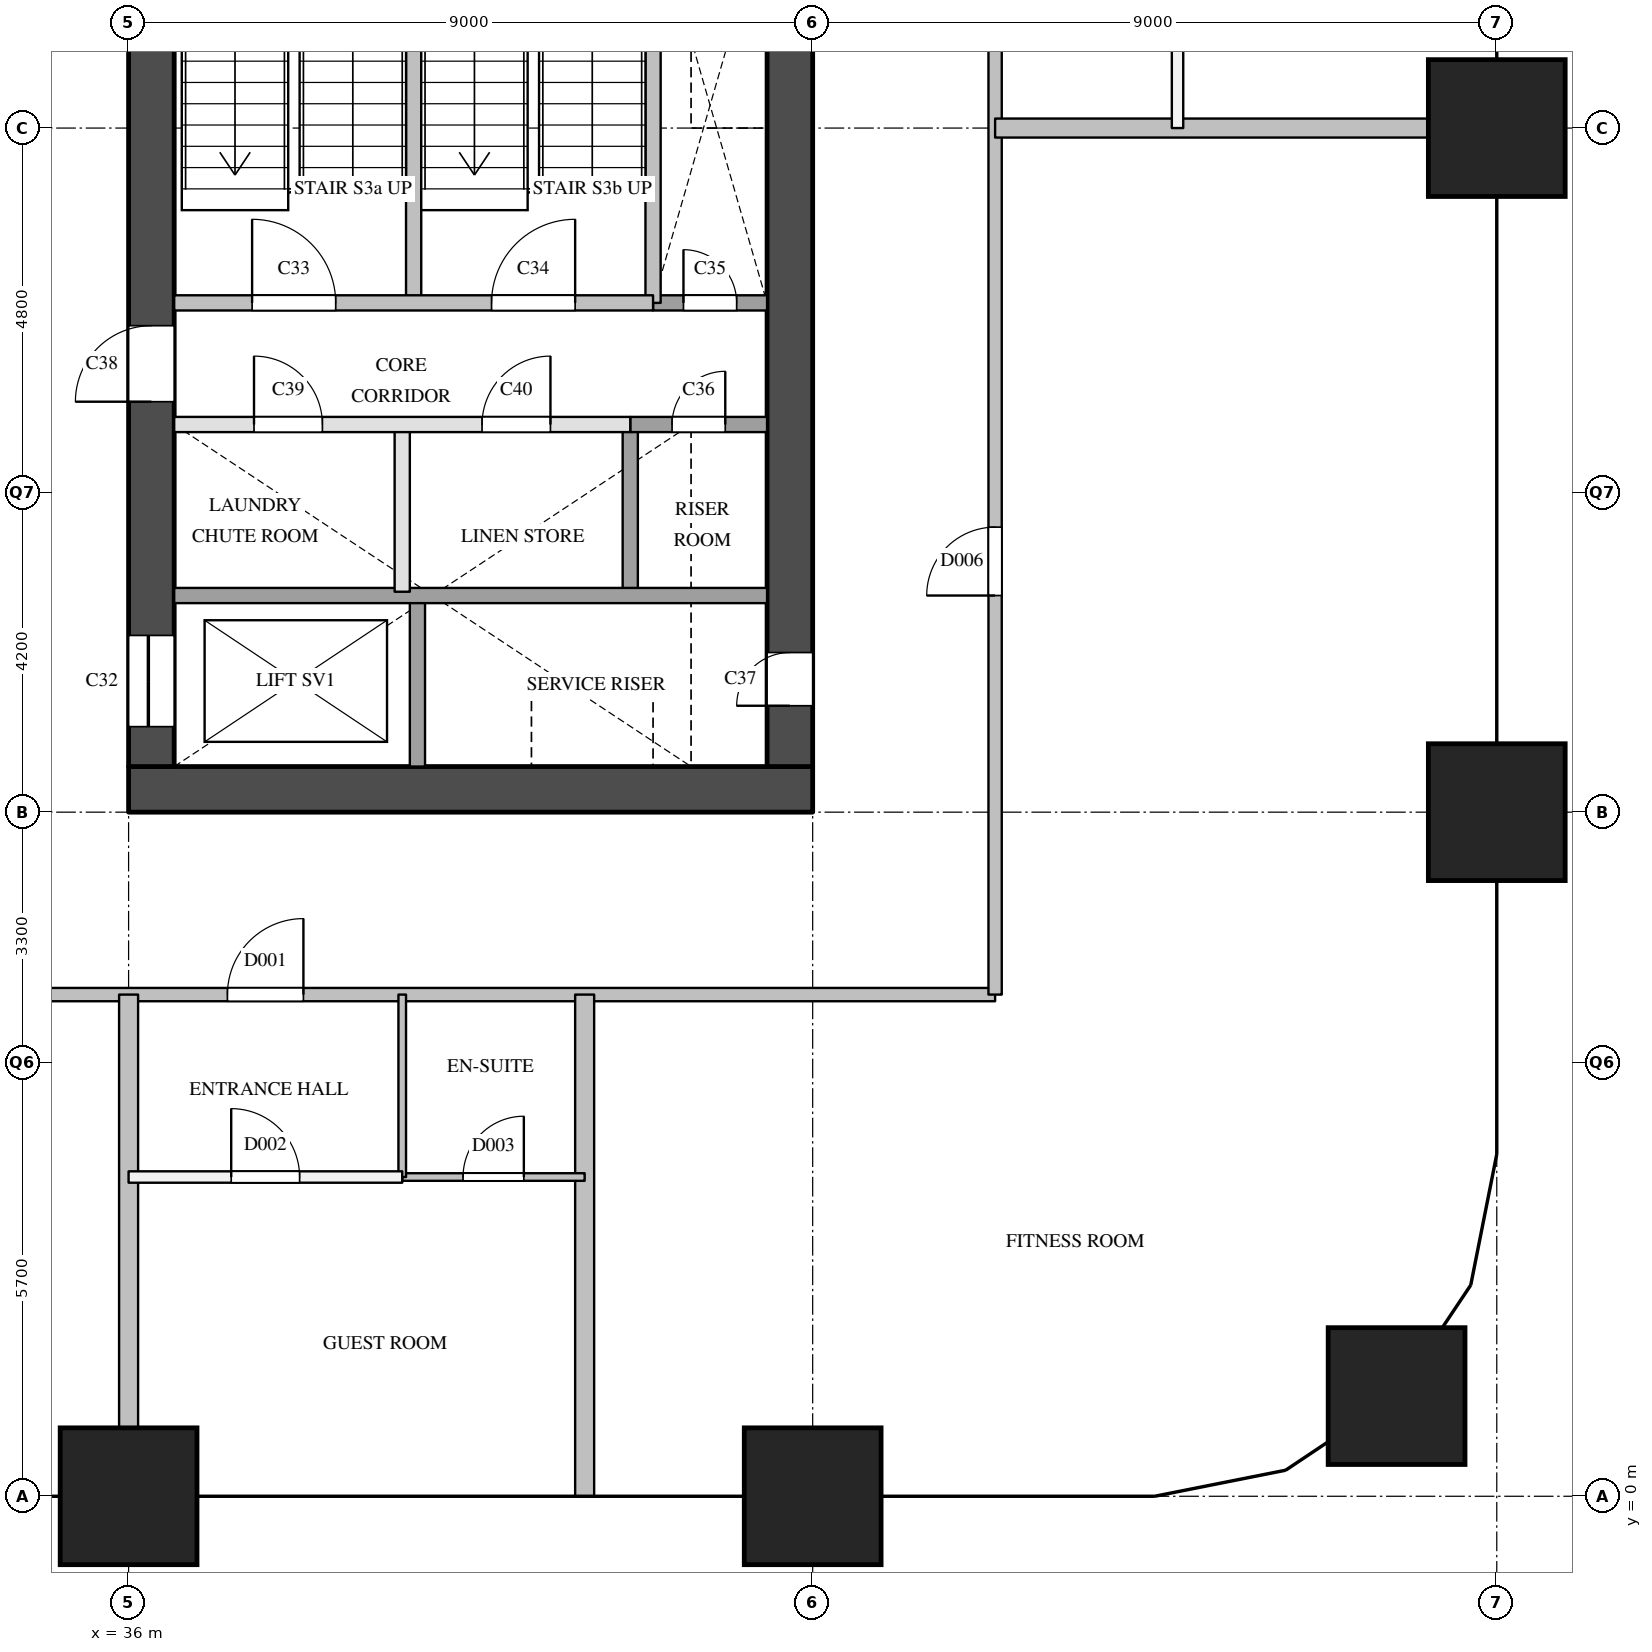
"""IFC4 building model, lengths in metres.
Left out: names, types, materials, properties, quantities, classifications, styles, units other than length and angle.
Written with IfcOpenShell. Run it as: python <this file> out.ifc"""

import sys

from ifc_helpers import new_model, si_unit, direction, frame, frame_2d, origin, origin_2d, place, context, subcontext, project, spatial, rectangle, extrude, element, fill, save


model = new_model("IFC4")
c1 = context("Model", 3, precision=1e-05, world=origin(), true_north=direction((0.0, 1.0)))
c2 = subcontext(c1, "Body", "Model", "MODEL_VIEW")
j1 = project(units=[si_unit("LENGTHUNIT", "METRE"), si_unit("PLANEANGLEUNIT", "RADIAN")], contexts=[c1])
p1 = place(None, origin())
s1 = spatial("IfcSite", under=j1, at=p1, CompositionType="ELEMENT")
p2 = place(p1, origin())
s2 = spatial("IfcBuilding", under=s1, at=p2, CompositionType="ELEMENT")
p3 = place(p2, frame((0.0, 0.0, 65.2)))
s3 = spatial("IfcBuildingStorey", under=s2, at=p3, CompositionType="ELEMENT", Elevation=65.2)
for number, where, z_axis, x_axis in (
    (1, (36.0, 0.0, 0.0), (0.0, 0.0, 1.0), (1.0, 0.0, 0.0)),
    (2, (45.0, 0.0, 0.0), (0.0, 0.0, 1.0), (1.0, 0.0, 0.0)),
    (3, (52.682, 1.318, 0.0), (0.0, 0.0, 1.0), (1.0, 0.0, 0.0)),
    (4, (54.0, 9.0, 0.0), (0.0, 0.0, 1.0), (1.0, 0.0, 0.0)),
    (5, (54.0, 18.0, 0.0), (0.0, 0.0, 1.0), (1.0, 0.0, 0.0)),
):
    element("IfcColumn", number, at=place(p3, frame(where, z_axis=z_axis, x_axis=x_axis)), inside=s3, PredefinedType="COLUMN", context=c2, shape_type="SweptSolid", body=[
        extrude(rectangle(XDim=1.8, YDim=1.8, at=origin_2d()), origin(), (0.0, 0.0, 1.0), 3.8),
    ])
p4 = place(p3, frame((36.0, 9.3, 0.0), z_axis=(0.0, 0.0, 1.0), x_axis=(1.0, 0.0, 0.0)))
e6 = element("IfcWall", 6, at=p4, inside=s3, PredefinedType="SHEAR", context=c2, shape_type="SweptSolid", body=[
    extrude(rectangle(XDim=9.0, YDim=0.6, at=frame_2d((4.5, 0.0))), origin(), (0.0, 0.0, 1.0), 3.5),
])
p5 = place(p3, frame((36.3, 9.6, 0.0), z_axis=(0.0, 0.0, 1.0), x_axis=(0.0, 1.0, 0.0)))
e7 = element("IfcWall", 7, at=p5, inside=s3, PredefinedType="SHEAR", context=c2, shape_type="SweptSolid", body=[
    extrude(rectangle(XDim=12.3, YDim=0.6, at=frame_2d((6.15, 0.0))), origin(), (0.0, 0.0, 1.0), 3.5),
])
p6 = place(p5, frame((0.525, 0.0, 0.0)))
e8 = element("IfcOpeningElement", 8, at=p6, cuts=e7, PredefinedType="OPENING", context=c2, shape_type="SweptSolid", body=[
    extrude(rectangle(XDim=1.2, YDim=2.1, at=frame_2d((0.6, 1.05))), frame((0.0, 0.31, 0.0), z_axis=(0.0, -1.0, 0.0), x_axis=(1.0, 0.0, 0.0)), (0.0, 0.0, 1.0), 0.62),
])
p7 = place(p5, frame((4.8, 0.0, 0.0)))
e9 = element("IfcOpeningElement", 9, at=p7, cuts=e7, PredefinedType="OPENING", context=c2, shape_type="SweptSolid", body=[
    extrude(rectangle(XDim=1.0, YDim=2.1, at=frame_2d((0.5, 1.05))), frame((0.0, 0.31, 0.0), z_axis=(0.0, -1.0, 0.0), x_axis=(1.0, 0.0, 0.0)), (0.0, 0.0, 1.0), 0.62),
])
p8 = place(p3, frame((44.7, 9.6, 0.0), z_axis=(0.0, 0.0, 1.0), x_axis=(0.0, 1.0, 0.0)))
e10 = element("IfcWall", 10, at=p8, inside=s3, PredefinedType="SHEAR", context=c2, shape_type="SweptSolid", body=[
    extrude(rectangle(XDim=12.3, YDim=0.6, at=frame_2d((6.15, 0.0))), origin(), (0.0, 0.0, 1.0), 3.5),
])
p9 = place(p8, frame((0.8, 0.0, 0.0)))
e11 = element("IfcOpeningElement", 11, at=p9, cuts=e10, PredefinedType="OPENING", context=c2, shape_type="SweptSolid", body=[
    extrude(rectangle(XDim=0.7, YDim=2.1, at=frame_2d((0.35, 1.05))), frame((0.0, 0.31, 0.0), z_axis=(0.0, -1.0, 0.0), x_axis=(1.0, 0.0, 0.0)), (0.0, 0.0, 1.0), 0.62),
])
p10 = place(p3, frame((39.6, 11.9, 0.0), z_axis=(0.0, 0.0, 1.0), x_axis=(0.0, 1.0, 0.0)))
e12 = element("IfcWall", 12, at=p10, inside=s3, PredefinedType="PARTITIONING", context=c2, shape_type="SweptSolid", body=[
    extrude(rectangle(XDim=2.2, YDim=0.2, at=frame_2d((1.1, 0.0))), origin(), (0.0, 0.0, 1.0), 3.5),
])
p11 = place(p3, frame((39.75, 15.7, 0.0), z_axis=(0.0, 0.0, 1.0), x_axis=(0.0, 1.0, 0.0)))
e13 = element("IfcWall", 13, at=p11, inside=s3, PredefinedType="SOLIDWALL", context=c2, shape_type="SweptSolid", body=[
    extrude(rectangle(XDim=4.3, YDim=0.2, at=frame_2d((2.15, 0.0))), origin(), (0.0, 0.0, 1.0), 3.5),
])
p12 = place(p3, frame((39.8, 9.6, 0.0), z_axis=(0.0, 0.0, 1.0), x_axis=(0.0, 1.0, 0.0)))
e14 = element("IfcWall", 14, at=p12, inside=s3, PredefinedType="SOLIDWALL", context=c2, shape_type="SweptSolid", body=[
    extrude(rectangle(XDim=2.3, YDim=0.2, at=frame_2d((1.15, 0.0))), origin(), (0.0, 0.0, 1.0), 3.5),
])
p13 = place(p3, frame((42.6, 11.9, 0.0), z_axis=(0.0, 0.0, 1.0), x_axis=(0.0, 1.0, 0.0)))
e15 = element("IfcWall", 15, at=p13, inside=s3, PredefinedType="SOLIDWALL", context=c2, shape_type="SweptSolid", body=[
    extrude(rectangle(XDim=2.2, YDim=0.2, at=frame_2d((1.1, 0.0))), origin(), (0.0, 0.0, 1.0), 3.5),
])
p14 = place(p3, frame((42.9, 15.7, 0.0), z_axis=(0.0, 0.0, 1.0), x_axis=(0.0, 1.0, 0.0)))
e16 = element("IfcWall", 16, at=p14, inside=s3, PredefinedType="SOLIDWALL", context=c2, shape_type="SweptSolid", body=[
    extrude(rectangle(XDim=4.3, YDim=0.2, at=frame_2d((2.15, 0.0))), origin(), (0.0, 0.0, 1.0), 3.5),
])
p15 = place(p3, frame((36.6, 11.85, 0.0), z_axis=(0.0, 0.0, 1.0), x_axis=(1.0, 0.0, 0.0)))
e17 = element("IfcWall", 17, at=p15, inside=s3, PredefinedType="SOLIDWALL", context=c2, shape_type="SweptSolid", body=[
    extrude(rectangle(XDim=7.8, YDim=0.2, at=frame_2d((3.9, 0.0))), origin(), (0.0, 0.0, 1.0), 3.5),
])
p16 = place(p3, frame((36.6, 14.1, 0.0), z_axis=(0.0, 0.0, 1.0), x_axis=(1.0, 0.0, 0.0)))
e18 = element("IfcWall", 18, at=p16, inside=s3, PredefinedType="PARTITIONING", context=c2, shape_type="SweptSolid", body=[
    extrude(rectangle(XDim=6.0, YDim=0.2, at=frame_2d((3.0, 0.0))), origin(), (0.0, 0.0, 1.0), 3.5),
])
p17 = place(p16, frame((1.05, 0.0, 0.0)))
e19 = element("IfcOpeningElement", 19, at=p17, cuts=e18, PredefinedType="OPENING", context=c2, shape_type="SweptSolid", body=[
    extrude(rectangle(XDim=0.9, YDim=2.1, at=frame_2d((0.45, 1.05))), frame((0.0, 0.11, 0.0), z_axis=(0.0, -1.0, 0.0), x_axis=(1.0, 0.0, 0.0)), (0.0, 0.0, 1.0), 0.22),
])
p18 = place(p16, frame((4.05, 0.0, 0.0)))
e20 = element("IfcOpeningElement", 20, at=p18, cuts=e18, PredefinedType="OPENING", context=c2, shape_type="SweptSolid", body=[
    extrude(rectangle(XDim=0.9, YDim=2.1, at=frame_2d((0.45, 1.05))), frame((0.0, 0.11, 0.0), z_axis=(0.0, -1.0, 0.0), x_axis=(1.0, 0.0, 0.0)), (0.0, 0.0, 1.0), 0.22),
])
p19 = place(p3, frame((42.6, 14.1, 0.0), z_axis=(0.0, 0.0, 1.0), x_axis=(1.0, 0.0, 0.0)))
e21 = element("IfcWall", 21, at=p19, inside=s3, PredefinedType="SOLIDWALL", context=c2, shape_type="SweptSolid", body=[
    extrude(rectangle(XDim=1.8, YDim=0.2, at=frame_2d((0.9, 0.0))), origin(), (0.0, 0.0, 1.0), 3.5),
])
p20 = place(p19, frame((0.55, 0.0, 0.0)))
e22 = element("IfcOpeningElement", 22, at=p20, cuts=e21, PredefinedType="OPENING", context=c2, shape_type="SweptSolid", body=[
    extrude(rectangle(XDim=0.7, YDim=2.1, at=frame_2d((0.35, 1.05))), frame((0.0, 0.11, 0.0), z_axis=(0.0, -1.0, 0.0), x_axis=(1.0, 0.0, 0.0)), (0.0, 0.0, 1.0), 0.22),
])
p21 = place(p3, frame((42.9, 15.7, 0.0), z_axis=(0.0, 0.0, 1.0), x_axis=(1.0, 0.0, 0.0)))
e23 = element("IfcWall", 23, at=p21, inside=s3, PredefinedType="SOLIDWALL", context=c2, shape_type="SweptSolid", body=[
    extrude(rectangle(XDim=1.5, YDim=0.2, at=frame_2d((0.75, 0.0))), origin(), (0.0, 0.0, 1.0), 3.5),
])
p22 = place(p21, frame((0.4, 0.0, 0.0)))
e24 = element("IfcOpeningElement", 24, at=p22, cuts=e23, PredefinedType="OPENING", context=c2, shape_type="SweptSolid", body=[
    extrude(rectangle(XDim=0.7, YDim=2.1, at=frame_2d((0.35, 1.05))), frame((0.0, 0.11, 0.0), z_axis=(0.0, -1.0, 0.0), x_axis=(1.0, 0.0, 0.0)), (0.0, 0.0, 1.0), 0.22),
])
p23 = place(p3, frame((36.6, 15.7, 0.0), z_axis=(0.0, 0.0, 1.0), x_axis=(1.0, 0.0, 0.0)))
e25 = element("IfcWall", 25, at=p23, inside=s3, PredefinedType="SOLIDWALL", context=c2, shape_type="SweptSolid", body=[
    extrude(rectangle(XDim=6.3, YDim=0.2, at=frame_2d((3.15, 0.0))), origin(), (0.0, 0.0, 1.0), 3.5),
])
p24 = place(p23, frame((1.025, 0.0, 0.0)))
e26 = element("IfcOpeningElement", 26, at=p24, cuts=e25, PredefinedType="OPENING", context=c2, shape_type="SweptSolid", body=[
    extrude(rectangle(XDim=1.1, YDim=2.1, at=frame_2d((0.55, 1.05))), frame((0.0, 0.11, 0.0), z_axis=(0.0, -1.0, 0.0), x_axis=(1.0, 0.0, 0.0)), (0.0, 0.0, 1.0), 0.22),
])
p25 = place(p23, frame((4.175, 0.0, 0.0)))
e27 = element("IfcOpeningElement", 27, at=p25, cuts=e25, PredefinedType="OPENING", context=c2, shape_type="SweptSolid", body=[
    extrude(rectangle(XDim=1.1, YDim=2.1, at=frame_2d((0.55, 1.05))), frame((0.0, 0.11, 0.0), z_axis=(0.0, -1.0, 0.0), x_axis=(1.0, 0.0, 0.0)), (0.0, 0.0, 1.0), 0.22),
])
p26 = place(p3, frame((33.6, 6.6, 0.0), z_axis=(0.0, 0.0, 1.0), x_axis=(1.0, 0.0, 0.0)))
e28 = element("IfcWall", 28, at=p26, inside=s3, PredefinedType="PARTITIONING", context=c2, shape_type="SweptSolid", body=[
    extrude(rectangle(XDim=13.8, YDim=0.175, at=frame_2d((6.9, 0.0))), origin(), (0.0, 0.0, 1.0), 3.5),
])
p27 = place(p26, frame((3.7, 0.0, 0.0)))
e29 = element("IfcOpeningElement", 29, at=p27, cuts=e28, PredefinedType="OPENING", context=c2, shape_type="SweptSolid", body=[
    extrude(rectangle(XDim=1.0, YDim=2.1, at=frame_2d((0.5, 1.05))), frame((0.0, 0.097, 0.0), z_axis=(0.0, -1.0, 0.0), x_axis=(1.0, 0.0, 0.0)), (0.0, 0.0, 1.0), 0.195),
])
p28 = place(p3, frame((47.4, 6.6, 0.0), z_axis=(0.0, 0.0, 1.0), x_axis=(0.0, 1.0, 0.0)))
e30 = element("IfcWall", 30, at=p28, inside=s3, PredefinedType="PARTITIONING", context=c2, shape_type="SweptSolid", body=[
    extrude(rectangle(XDim=18.3, YDim=0.175, at=frame_2d((9.15, 0.0))), origin(), (0.0, 0.0, 1.0), 3.5),
])
p29 = place(p28, frame((5.25, 0.0, 0.0)))
e31 = element("IfcOpeningElement", 31, at=p29, cuts=e30, PredefinedType="OPENING", context=c2, shape_type="SweptSolid", body=[
    extrude(rectangle(XDim=0.9, YDim=2.1, at=frame_2d((0.45, 1.05))), frame((0.0, 0.097, 0.0), z_axis=(0.0, -1.0, 0.0), x_axis=(1.0, 0.0, 0.0)), (0.0, 0.0, 1.0), 0.195),
])
p30 = place(p28, frame((12.7, 0.0, 0.0)))
e32 = element("IfcOpeningElement", 32, at=p30, cuts=e30, PredefinedType="OPENING", context=c2, shape_type="SweptSolid", body=[
    extrude(rectangle(XDim=1.0, YDim=2.1, at=frame_2d((0.5, 1.05))), frame((0.0, 0.097, 0.0), z_axis=(0.0, -1.0, 0.0), x_axis=(1.0, 0.0, 0.0)), (0.0, 0.0, 1.0), 0.195),
])
p31 = place(p3, frame((36.0, 4.2, 0.0), z_axis=(0.0, 0.0, 1.0), x_axis=(1.0, 0.0, 0.0)))
e33 = element("IfcWall", 33, at=p31, inside=s3, PredefinedType="PARTITIONING", context=c2, shape_type="SweptSolid", body=[
    extrude(rectangle(XDim=3.6, YDim=0.15, at=frame_2d((1.8, 0.0))), origin(), (0.0, 0.0, 1.0), 3.5),
])
p32 = place(p31, frame((1.35, 0.0, 0.0)))
e34 = element("IfcOpeningElement", 34, at=p32, cuts=e33, PredefinedType="OPENING", context=c2, shape_type="SweptSolid", body=[
    extrude(rectangle(XDim=0.9, YDim=2.1, at=frame_2d((0.45, 1.05))), frame((0.0, 0.085, 0.0), z_axis=(0.0, -1.0, 0.0), x_axis=(1.0, 0.0, 0.0)), (0.0, 0.0, 1.0), 0.17),
])
p33 = place(p3, frame((49.8, 18.0, 0.0), z_axis=(0.0, 0.0, 1.0), x_axis=(0.0, 1.0, 0.0)))
e35 = element("IfcWall", 35, at=p33, inside=s3, PredefinedType="PARTITIONING", context=c2, shape_type="SweptSolid", body=[
    extrude(rectangle(XDim=3.6, YDim=0.15, at=frame_2d((1.8, 0.0))), origin(), (0.0, 0.0, 1.0), 3.5),
])
p34 = place(p33, frame((1.35, 0.0, 0.0)))
e36 = element("IfcOpeningElement", 36, at=p34, cuts=e35, PredefinedType="OPENING", context=c2, shape_type="SweptSolid", body=[
    extrude(rectangle(XDim=0.9, YDim=2.1, at=frame_2d((0.45, 1.05))), frame((0.0, 0.085, 0.0), z_axis=(0.0, -1.0, 0.0), x_axis=(1.0, 0.0, 0.0)), (0.0, 0.0, 1.0), 0.17),
])
for number, where, z_axis, x_axis in (
    (37, (47.4, 18.0, 0.0), (0.0, 0.0, 1.0), (1.0, 0.0, 0.0)),
    (38, (36.0, 0.0, 0.0), (0.0, 0.0, 1.0), (0.0, 1.0, 0.0)),
):
    element("IfcWall", number, at=place(p3, frame(where, z_axis=z_axis, x_axis=x_axis)), inside=s3, PredefinedType="PARTITIONING", context=c2, shape_type="SweptSolid", body=[
        extrude(rectangle(XDim=6.6, YDim=0.25, at=frame_2d((3.3, 0.0))), origin(), (0.0, 0.0, 1.0), 3.5),
    ])
p35 = place(p3, frame((42.0, 0.0, 0.0), z_axis=(0.0, 0.0, 1.0), x_axis=(0.0, 1.0, 0.0)))
e39 = element("IfcWall", 39, at=p35, inside=s3, PredefinedType="PARTITIONING", context=c2, shape_type="SweptSolid", body=[
    extrude(rectangle(XDim=6.6, YDim=0.25, at=frame_2d((3.3, 0.0))), origin(), (0.0, 0.0, 1.0), 2.5),
])
p36 = place(p3, frame((39.6, 4.2, 0.0), z_axis=(0.0, 0.0, 1.0), x_axis=(1.0, 0.0, 0.0)))
e40 = element("IfcWall", 40, at=p36, inside=s3, PredefinedType="PARTITIONING", context=c2, shape_type="SweptSolid", body=[
    extrude(rectangle(XDim=2.4, YDim=0.1, at=frame_2d((1.2, 0.0))), origin(), (0.0, 0.0, 1.0), 3.5),
])
p37 = place(p36, frame((0.8, 0.0, 0.0)))
e41 = element("IfcOpeningElement", 41, at=p37, cuts=e40, PredefinedType="OPENING", context=c2, shape_type="SweptSolid", body=[
    extrude(rectangle(XDim=0.8, YDim=2.1, at=frame_2d((0.4, 1.05))), frame((0.0, 0.06, 0.0), z_axis=(0.0, -1.0, 0.0), x_axis=(1.0, 0.0, 0.0)), (0.0, 0.0, 1.0), 0.12),
])
p38 = place(p3, frame((39.6, 4.2, 0.0), z_axis=(0.0, 0.0, 1.0), x_axis=(0.0, 1.0, 0.0)))
e42 = element("IfcWall", 42, at=p38, inside=s3, PredefinedType="PARTITIONING", context=c2, shape_type="SweptSolid", body=[
    extrude(rectangle(XDim=2.4, YDim=0.1, at=frame_2d((1.2, 0.0))), origin(), (0.0, 0.0, 1.0), 3.5),
])
p39 = place(p6, origin())
e43 = element("IfcDoor", 43, at=p39, inside=s3, OperationType="SLIDING_TO_LEFT", PredefinedType="DOOR", context=c2, shape_type="SweptSolid", body=[
    extrude(rectangle(XDim=1.2, YDim=2.1, at=frame_2d((0.6, 1.05))), frame((0.0, 0.025, 0.0), z_axis=(0.0, -1.0, 0.0), x_axis=(1.0, 0.0, 0.0)), (0.0, 0.0, 1.0), 0.05),
])
fill(e8, e43)
p40 = place(p24, origin())
e44 = element("IfcDoor", 44, at=p40, inside=s3, OperationType="SINGLE_SWING_LEFT", PredefinedType="DOOR", context=c2, shape_type="SweptSolid", body=[
    extrude(rectangle(XDim=1.1, YDim=2.1, at=frame_2d((0.55, 1.05))), frame((0.0, 0.025, 0.0), z_axis=(0.0, -1.0, 0.0), x_axis=(1.0, 0.0, 0.0)), (0.0, 0.0, 1.0), 0.05),
])
fill(e26, e44)
p41 = place(p25, origin())
e45 = element("IfcDoor", 45, at=p41, inside=s3, OperationType="SINGLE_SWING_RIGHT", PredefinedType="DOOR", context=c2, shape_type="SweptSolid", body=[
    extrude(rectangle(XDim=1.1, YDim=2.1, at=frame_2d((0.55, 1.05))), frame((0.0, 0.025, 0.0), z_axis=(0.0, -1.0, 0.0), x_axis=(1.0, 0.0, 0.0)), (0.0, 0.0, 1.0), 0.05),
])
fill(e27, e45)
p42 = place(p22, origin())
e46 = element("IfcDoor", 46, at=p42, inside=s3, OperationType="SINGLE_SWING_LEFT", PredefinedType="DOOR", context=c2, shape_type="SweptSolid", body=[
    extrude(rectangle(XDim=0.7, YDim=2.1, at=frame_2d((0.35, 1.05))), frame((0.0, 0.025, 0.0), z_axis=(0.0, -1.0, 0.0), x_axis=(1.0, 0.0, 0.0)), (0.0, 0.0, 1.0), 0.05),
])
fill(e24, e46)
p43 = place(p20, origin())
e47 = element("IfcDoor", 47, at=p43, inside=s3, OperationType="SINGLE_SWING_RIGHT", PredefinedType="DOOR", context=c2, shape_type="SweptSolid", body=[
    extrude(rectangle(XDim=0.7, YDim=2.1, at=frame_2d((0.35, 1.05))), frame((0.0, 0.025, 0.0), z_axis=(0.0, -1.0, 0.0), x_axis=(1.0, 0.0, 0.0)), (0.0, 0.0, 1.0), 0.05),
])
fill(e22, e47)
p44 = place(p9, origin())
e48 = element("IfcDoor", 48, at=p44, inside=s3, OperationType="SINGLE_SWING_LEFT", PredefinedType="DOOR", context=c2, shape_type="SweptSolid", body=[
    extrude(rectangle(XDim=0.7, YDim=2.1, at=frame_2d((0.35, 1.05))), frame((0.0, 0.025, 0.0), z_axis=(0.0, -1.0, 0.0), x_axis=(1.0, 0.0, 0.0)), (0.0, 0.0, 1.0), 0.05),
])
fill(e11, e48)
p45 = place(p7, origin())
e49 = element("IfcDoor", 49, at=p45, inside=s3, OperationType="SINGLE_SWING_LEFT", PredefinedType="DOOR", context=c2, shape_type="SweptSolid", body=[
    extrude(rectangle(XDim=1.0, YDim=2.1, at=frame_2d((0.5, 1.05))), frame((0.0, 0.025, 0.0), z_axis=(0.0, -1.0, 0.0), x_axis=(1.0, 0.0, 0.0)), (0.0, 0.0, 1.0), 0.05),
])
fill(e9, e49)
p46 = place(p17, origin())
e50 = element("IfcDoor", 50, at=p46, inside=s3, OperationType="SINGLE_SWING_LEFT", PredefinedType="DOOR", context=c2, shape_type="SweptSolid", body=[
    extrude(rectangle(XDim=0.9, YDim=2.1, at=frame_2d((0.45, 1.05))), frame((0.0, 0.025, 0.0), z_axis=(0.0, -1.0, 0.0), x_axis=(1.0, 0.0, 0.0)), (0.0, 0.0, 1.0), 0.05),
])
fill(e19, e50)
p47 = place(p18, origin())
e51 = element("IfcDoor", 51, at=p47, inside=s3, OperationType="SINGLE_SWING_RIGHT", PredefinedType="DOOR", context=c2, shape_type="SweptSolid", body=[
    extrude(rectangle(XDim=0.9, YDim=2.1, at=frame_2d((0.45, 1.05))), frame((0.0, 0.025, 0.0), z_axis=(0.0, -1.0, 0.0), x_axis=(1.0, 0.0, 0.0)), (0.0, 0.0, 1.0), 0.05),
])
fill(e20, e51)
p48 = place(p27, origin())
e52 = element("IfcDoor", 52, at=p48, inside=s3, OperationType="SINGLE_SWING_RIGHT", PredefinedType="DOOR", context=c2, shape_type="SweptSolid", body=[
    extrude(rectangle(XDim=1.0, YDim=2.1, at=frame_2d((0.5, 1.05))), frame((0.0, 0.025, 0.0), z_axis=(0.0, -1.0, 0.0), x_axis=(1.0, 0.0, 0.0)), (0.0, 0.0, 1.0), 0.05),
])
fill(e29, e52)
p49 = place(p32, origin())
e53 = element("IfcDoor", 53, at=p49, inside=s3, OperationType="SINGLE_SWING_LEFT", PredefinedType="DOOR", context=c2, shape_type="SweptSolid", body=[
    extrude(rectangle(XDim=0.9, YDim=2.1, at=frame_2d((0.45, 1.05))), frame((0.0, 0.025, 0.0), z_axis=(0.0, -1.0, 0.0), x_axis=(1.0, 0.0, 0.0)), (0.0, 0.0, 1.0), 0.05),
])
fill(e34, e53)
p50 = place(p37, origin())
e54 = element("IfcDoor", 54, at=p50, inside=s3, OperationType="SINGLE_SWING_RIGHT", PredefinedType="DOOR", context=c2, shape_type="SweptSolid", body=[
    extrude(rectangle(XDim=0.8, YDim=2.1, at=frame_2d((0.4, 1.05))), frame((0.0, 0.025, 0.0), z_axis=(0.0, -1.0, 0.0), x_axis=(1.0, 0.0, 0.0)), (0.0, 0.0, 1.0), 0.05),
])
fill(e41, e54)
p51 = place(p29, origin())
e55 = element("IfcDoor", 55, at=p51, inside=s3, OperationType="SINGLE_SWING_LEFT", PredefinedType="DOOR", context=c2, shape_type="SweptSolid", body=[
    extrude(rectangle(XDim=0.9, YDim=2.1, at=frame_2d((0.45, 1.05))), frame((0.0, 0.025, 0.0), z_axis=(0.0, -1.0, 0.0), x_axis=(1.0, 0.0, 0.0)), (0.0, 0.0, 1.0), 0.05),
])
fill(e31, e55)
save(model, sys.argv[1])
